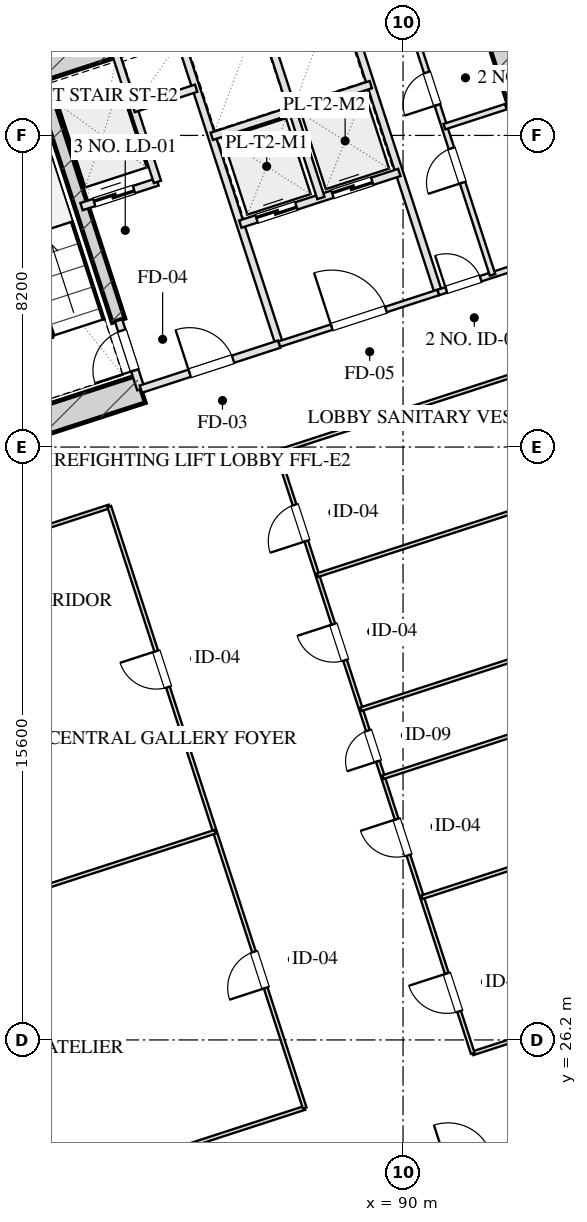
"""IFC4 building model, lengths in metres.
Left out: names, types, materials, properties, quantities, classifications, styles, units other than length and angle.
Written with IfcOpenShell. Run it as: python <this file> out.ifc"""

import sys

from ifc_helpers import new_model, si_unit, direction, frame, frame_2d, origin, place, context, subcontext, project, spatial, rectangle, extrude, element, fill, save


model = new_model("IFC4")
c1 = context("Model", 3, precision=1e-05, world=origin(), true_north=direction((0.0, 1.0)))
c2 = subcontext(c1, "Body", "Model", "MODEL_VIEW")
j1 = project(units=[si_unit("LENGTHUNIT", "METRE"), si_unit("PLANEANGLEUNIT", "RADIAN")], contexts=[c1])
p1 = place(None, origin())
s1 = spatial("IfcSite", under=j1, at=p1, CompositionType="ELEMENT")
p2 = place(p1, origin())
s2 = spatial("IfcBuilding", under=s1, at=p2, CompositionType="ELEMENT")
p3 = place(p2, frame((0.0, 0.0, 74.75)))
s3 = spatial("IfcBuildingStorey", under=s2, at=p3, CompositionType="ELEMENT", Elevation=74.75)
p4 = place(p3, frame((76.272, 50.443, 0.0), z_axis=(0.0, 0.0, 1.0), x_axis=(0.951056072937, 0.309018358888, 0.0)))
e1 = element("IfcWall", 1, at=p4, inside=s3, PredefinedType="SHEAR", context=c2, shape_type="SweptSolid", body=[
    extrude(rectangle(XDim=16.55, YDim=0.75, at=frame_2d((8.275, 0.0))), origin(), (0.0, 0.0, 1.0), 3.45),
])
p5 = place(p3, frame((94.515, 46.639, 0.0), z_axis=(0.0, 0.0, 1.0), x_axis=(-0.309016134813, 0.951056795583, 0.0)))
e2 = element("IfcWall", 2, at=p5, inside=s3, PredefinedType="SHEAR", context=c2, shape_type="SweptSolid", body=[
    extrude(rectangle(XDim=9.63, YDim=0.75, at=frame_2d((4.815, 0.0))), origin(), (0.0, 0.0, 1.0), 3.45),
])
p6 = place(p3, frame((82.514, 45.131, 0.0), z_axis=(0.0, 0.0, 1.0), x_axis=(-0.308988790936, 0.951065679686, 0.0)))
e3 = element("IfcWall", 3, at=p6, inside=s3, PredefinedType="SHEAR", context=c2, shape_type="SweptSolid", body=[
    extrude(rectangle(XDim=6.98, YDim=0.35, at=frame_2d((3.49, 0.0))), origin(), (0.0, 0.0, 1.0), 3.45),
])
p7 = place(p3, frame((79.016, 41.997, 0.0), z_axis=(0.0, 0.0, 1.0), x_axis=(0.95106038264, 0.309005094736, 0.0)))
e4 = element("IfcWall", 4, at=p7, inside=s3, PredefinedType="SHEAR", context=c2, shape_type="SweptSolid", body=[
    extrude(rectangle(XDim=4.295, YDim=0.75, at=frame_2d((2.147, 0.0))), origin(), (0.0, 0.0, 1.0), 3.45),
])
p8 = place(p3, frame((89.899, 22.401, 0.0), z_axis=(0.0, 0.0, 1.0), x_axis=(0.951046716504, 0.309047153403, 0.0)))
e5 = element("IfcWall", 5, at=p8, inside=s3, PredefinedType="PARTITIONING", context=c2, shape_type="SweptSolid", body=[
    extrude(rectangle(XDim=3.83, YDim=0.2, at=frame_2d((1.915, 0.0))), origin(), (0.0, 0.0, 1.0), 3.175),
])
p9 = place(p8, frame((1.35, 0.0, 0.0)))
e6 = element("IfcOpeningElement", 6, at=p9, cuts=e5, PredefinedType="OPENING", context=c2, shape_type="SweptSolid", body=[
    extrude(rectangle(XDim=1.2, YDim=2.05, at=frame_2d((0.6, 1.025))), frame((0.0, 0.11, 0.0), z_axis=(0.0, -1.0, 0.0), x_axis=(1.0, 0.0, 0.0)), (0.0, 0.0, 1.0), 0.22),
])
p10 = place(p3, frame((83.101, 43.324, 0.0), z_axis=(0.0, 0.0, 1.0), x_axis=(-0.309048298632, 0.951046344356, 0.0)))
e7 = element("IfcWall", 7, at=p10, inside=s3, PredefinedType="PARTITIONING", context=c2, shape_type="SweptSolid", body=[
    extrude(rectangle(XDim=1.9, YDim=0.2, at=frame_2d((0.95, 0.0))), origin(), (0.0, 0.0, 1.0), 3.175),
])
p11 = place(p10, frame((0.52, 0.0, 0.0)))
e8 = element("IfcOpeningElement", 8, at=p11, cuts=e7, PredefinedType="OPENING", context=c2, shape_type="SweptSolid", body=[
    extrude(rectangle(XDim=1.1, YDim=2.05, at=frame_2d((0.55, 1.025))), frame((0.0, 0.11, 0.0), z_axis=(0.0, -1.0, 0.0), x_axis=(1.0, 0.0, 0.0)), (0.0, 0.0, 1.0), 0.22),
])
p12 = place(p3, frame((86.743, 44.508, 0.0), z_axis=(0.0, 0.0, 1.0), x_axis=(-0.309016001439, 0.951056838919, 0.0)))
e9 = element("IfcWall", 9, at=p12, inside=s3, PredefinedType="PARTITIONING", context=c2, shape_type="SweptSolid", body=[
    extrude(rectangle(XDim=8.43, YDim=0.2, at=frame_2d((4.215, 0.0))), origin(), (0.0, 0.0, 1.0), 3.175),
])
p13 = place(p3, frame((83.101, 43.324, 0.0), z_axis=(0.0, 0.0, 1.0), x_axis=(0.951052804469, 0.309028417967, 0.0)))
e10 = element("IfcWall", 10, at=p13, inside=s3, PredefinedType="PARTITIONING", context=c2, shape_type="SweptSolid", body=[
    extrude(rectangle(XDim=3.83, YDim=0.2, at=frame_2d((1.915, 0.0))), origin(), (0.0, 0.0, 1.0), 3.175),
])
p14 = place(p13, frame((1.35, 0.0, 0.0)))
e11 = element("IfcOpeningElement", 11, at=p14, cuts=e10, PredefinedType="OPENING", context=c2, shape_type="SweptSolid", body=[
    extrude(rectangle(XDim=1.2, YDim=2.05, at=frame_2d((0.6, 1.025))), frame((0.0, 0.11, 0.0), z_axis=(0.0, -1.0, 0.0), x_axis=(1.0, 0.0, 0.0)), (0.0, 0.0, 1.0), 0.22),
])
p15 = place(p3, frame((81.54, 48.127, 0.0), z_axis=(0.0, 0.0, 1.0), x_axis=(0.951062257173, 0.308999325213, 0.0)))
e12 = element("IfcWall", 12, at=p15, inside=s3, PredefinedType="PARTITIONING", context=c2, shape_type="SweptSolid", body=[
    extrude(rectangle(XDim=2.1, YDim=0.2, at=frame_2d((1.05, 0.0))), origin(), (0.0, 0.0, 1.0), 3.175),
])
p16 = place(p15, frame((0.35, 0.0, 0.0)))
e13 = element("IfcOpeningElement", 13, at=p16, cuts=e12, PredefinedType="OPENING", context=c2, shape_type="SweptSolid", body=[
    extrude(rectangle(XDim=1.1, YDim=2.05, at=frame_2d((0.55, 1.025))), frame((0.0, 0.11, 0.0), z_axis=(0.0, -1.0, 0.0), x_axis=(1.0, 0.0, 0.0)), (0.0, 0.0, 1.0), 0.22),
])
p17 = place(p3, frame((83.538, 48.776, 0.0), z_axis=(0.0, 0.0, 1.0), x_axis=(-0.3089935693, 0.951064127245, 0.0)))
e14 = element("IfcWall", 14, at=p17, inside=s3, PredefinedType="PARTITIONING", context=c2, shape_type="SweptSolid", body=[
    extrude(rectangle(XDim=3.7, YDim=0.2, at=frame_2d((1.85, 0.0))), origin(), (0.0, 0.0, 1.0), 3.175),
])
p18 = place(p3, frame((82.91, 50.707, 0.0), z_axis=(0.0, 0.0, 1.0), x_axis=(0.951041328149, 0.309063734775, 0.0)))
e15 = element("IfcWall", 15, at=p18, inside=s3, PredefinedType="PARTITIONING", context=c2, shape_type="SweptSolid", body=[
    extrude(rectangle(XDim=1.73, YDim=0.2, at=frame_2d((0.865, 0.0))), origin(), (0.0, 0.0, 1.0), 3.175),
])
p19 = place(p3, frame((90.928, 45.868, 0.0), z_axis=(0.0, 0.0, 1.0), x_axis=(-0.309042196757, 0.951048327176, 0.0)))
e16 = element("IfcWall", 16, at=p19, inside=s3, PredefinedType="PARTITIONING", context=c2, shape_type="SweptSolid", body=[
    extrude(rectangle(XDim=8.43, YDim=0.2, at=frame_2d((4.215, 0.0))), origin(), (0.0, 0.0, 1.0), 3.175),
])
p20 = place(p3, frame((86.743, 44.508, 0.0), z_axis=(0.0, 0.0, 1.0), x_axis=(0.951063829732, 0.308994485023, 0.0)))
e17 = element("IfcWall", 17, at=p20, inside=s3, PredefinedType="PARTITIONING", context=c2, shape_type="SweptSolid", body=[
    extrude(rectangle(XDim=4.4, YDim=0.15, at=frame_2d((2.2, 0.0))), origin(), (0.0, 0.0, 1.0), 3.175),
])
p21 = place(p20, frame((1.45, 0.0, 0.0)))
e18 = element("IfcOpeningElement", 18, at=p21, cuts=e17, PredefinedType="OPENING", context=c2, shape_type="SweptSolid", body=[
    extrude(rectangle(XDim=1.5, YDim=2.05, at=frame_2d((0.75, 1.025))), frame((0.0, 0.085, 0.0), z_axis=(0.0, -1.0, 0.0), x_axis=(1.0, 0.0, 0.0)), (0.0, 0.0, 1.0), 0.17),
])
p22 = place(p3, frame((85.718, 47.666, 0.0), z_axis=(0.0, 0.0, 1.0), x_axis=(0.951058531764, 0.30901079133, 0.0)))
e19 = element("IfcWall", 19, at=p22, inside=s3, PredefinedType="PARTITIONING", context=c2, shape_type="SweptSolid", body=[
    extrude(rectangle(XDim=4.4, YDim=0.2, at=frame_2d((2.2, 0.0))), origin(), (0.0, 0.0, 1.0), 3.175),
])
p23 = place(p22, frame((0.45, 0.0, 0.0)))
e20 = element("IfcOpeningElement", 20, at=p23, cuts=e19, PredefinedType="OPENING", context=c2, shape_type="SweptSolid", body=[
    extrude(rectangle(XDim=1.1, YDim=2.05, at=frame_2d((0.55, 1.025))), frame((0.0, 0.11, 0.0), z_axis=(0.0, -1.0, 0.0), x_axis=(1.0, 0.0, 0.0)), (0.0, 0.0, 1.0), 0.22),
])
p24 = place(p22, frame((2.55, 0.0, 0.0)))
e21 = element("IfcOpeningElement", 21, at=p24, cuts=e19, PredefinedType="OPENING", context=c2, shape_type="SweptSolid", body=[
    extrude(rectangle(XDim=1.1, YDim=2.05, at=frame_2d((0.55, 1.025))), frame((0.0, 0.11, 0.0), z_axis=(0.0, -1.0, 0.0), x_axis=(1.0, 0.0, 0.0)), (0.0, 0.0, 1.0), 0.22),
])
p25 = place(p3, frame((87.838, 48.354, 0.0), z_axis=(0.0, 0.0, 1.0), x_axis=(-0.3090093719, 0.951058992953, 0.0)))
e22 = element("IfcWall", 22, at=p25, inside=s3, PredefinedType="PARTITIONING", context=c2, shape_type="SweptSolid", body=[
    extrude(rectangle(XDim=5.11, YDim=0.2, at=frame_2d((2.555, 0.0))), origin(), (0.0, 0.0, 1.0), 3.175),
])
p26 = place(p3, frame((84.967, 49.977, 0.0), z_axis=(0.0, 0.0, 1.0), x_axis=(0.951063829732, 0.308994485023, 0.0)))
e23 = element("IfcWall", 23, at=p26, inside=s3, PredefinedType="PARTITIONING", context=c2, shape_type="SweptSolid", body=[
    extrude(rectangle(XDim=4.4, YDim=0.2, at=frame_2d((2.2, 0.0))), origin(), (0.0, 0.0, 1.0), 3.175),
])
p27 = place(p3, frame((90.928, 45.868, 0.0), z_axis=(0.0, 0.0, 1.0), x_axis=(0.951059297078, 0.309008435874, 0.0)))
e24 = element("IfcWall", 24, at=p27, inside=s3, PredefinedType="PARTITIONING", context=c2, shape_type="SweptSolid", body=[
    extrude(rectangle(XDim=3.2, YDim=0.15, at=frame_2d((1.6, 0.0))), origin(), (0.0, 0.0, 1.0), 3.175),
])
p28 = place(p27, frame((0.22, 0.0, 0.0)))
e25 = element("IfcOpeningElement", 25, at=p28, cuts=e24, PredefinedType="OPENING", context=c2, shape_type="SweptSolid", body=[
    extrude(rectangle(XDim=0.95, YDim=2.05, at=frame_2d((0.475, 1.025))), frame((0.0, 0.085, 0.0), z_axis=(0.0, -1.0, 0.0), x_axis=(1.0, 0.0, 0.0)), (0.0, 0.0, 1.0), 0.17),
])
p29 = place(p3, frame((92.355, 46.331, 0.0), z_axis=(0.0, 0.0, 1.0), x_axis=(-0.309007490203, 0.951059604335, 0.0)))
e26 = element("IfcWall", 26, at=p29, inside=s3, PredefinedType="PARTITIONING", context=c2, shape_type="SweptSolid", body=[
    extrude(rectangle(XDim=8.43, YDim=0.15, at=frame_2d((4.215, 0.0))), origin(), (0.0, 0.0, 1.0), 3.175),
])
p30 = place(p29, frame((2.55, 0.0, 0.0)))
e27 = element("IfcOpeningElement", 27, at=p30, cuts=e26, PredefinedType="OPENING", context=c2, shape_type="SweptSolid", body=[
    extrude(rectangle(XDim=0.95, YDim=2.05, at=frame_2d((0.475, 1.025))), frame((0.0, 0.085, 0.0), z_axis=(0.0, -1.0, 0.0), x_axis=(1.0, 0.0, 0.0)), (0.0, 0.0, 1.0), 0.17),
])
p31 = place(p29, frame((4.7, 0.0, 0.0)))
e28 = element("IfcOpeningElement", 28, at=p31, cuts=e26, PredefinedType="OPENING", context=c2, shape_type="SweptSolid", body=[
    extrude(rectangle(XDim=0.9, YDim=2.05, at=frame_2d((0.45, 1.025))), frame((0.0, 0.085, 0.0), z_axis=(0.0, -1.0, 0.0), x_axis=(1.0, 0.0, 0.0)), (0.0, 0.0, 1.0), 0.17),
])
p32 = place(p29, frame((6.8, 0.0, 0.0)))
e29 = element("IfcOpeningElement", 29, at=p32, cuts=e26, PredefinedType="OPENING", context=c2, shape_type="SweptSolid", body=[
    extrude(rectangle(XDim=0.9, YDim=2.05, at=frame_2d((0.45, 1.025))), frame((0.0, 0.085, 0.0), z_axis=(0.0, -1.0, 0.0), x_axis=(1.0, 0.0, 0.0)), (0.0, 0.0, 1.0), 0.17),
])
p33 = place(p3, frame((91.088, 50.23, 0.0), z_axis=(0.0, 0.0, 1.0), x_axis=(0.951054116971, 0.309024378638, 0.0)))
e30 = element("IfcWall", 30, at=p33, inside=s3, PredefinedType="PARTITIONING", context=c2, shape_type="SweptSolid", body=[
    extrude(rectangle(XDim=1.7, YDim=0.15, at=frame_2d((0.85, 0.0))), origin(), (0.0, 0.0, 1.0), 3.175),
])
p34 = place(p3, frame((74.691, 20.278, 0.0), z_axis=(0.0, 0.0, 1.0), x_axis=(0.951052712421, 0.309028701251, 0.0)))
e31 = element("IfcWall", 31, at=p34, inside=s3, PredefinedType="MOVABLE", context=c2, shape_type="SweptSolid", body=[
    extrude(rectangle(XDim=13.375, YDim=0.1, at=frame_2d((6.688, 0.0))), origin(), (0.0, 0.0, 1.0), 3.175),
])
p35 = place(p3, frame((91.834, 25.848, 0.0), z_axis=(0.0, 0.0, 1.0), x_axis=(0.951055605195, 0.309019798438, 0.0)))
e32 = element("IfcWall", 32, at=p35, inside=s3, PredefinedType="MOVABLE", context=c2, shape_type="SweptSolid", body=[
    extrude(rectangle(XDim=19.575, YDim=0.1, at=frame_2d((9.788, 0.0))), origin(), (0.0, 0.0, 1.0), 3.175),
])
p36 = place(p3, frame((69.549, 36.103, 0.0), z_axis=(0.0, 0.0, 1.0), x_axis=(0.951058077006, 0.309012190961, 0.0)))
e33 = element("IfcWall", 33, at=p36, inside=s3, PredefinedType="MOVABLE", context=c2, shape_type="SweptSolid", body=[
    extrude(rectangle(XDim=13.375, YDim=0.1, at=frame_2d((6.688, 0.0))), origin(), (0.0, 0.0, 1.0), 3.175),
])
p37 = place(p3, frame((86.692, 41.673, 0.0), z_axis=(0.0, 0.0, 1.0), x_axis=(0.951055605195, 0.309019798438, 0.0)))
e34 = element("IfcWall", 34, at=p37, inside=s3, PredefinedType="MOVABLE", context=c2, shape_type="SweptSolid", body=[
    extrude(rectangle(XDim=19.575, YDim=0.1, at=frame_2d((9.788, 0.0))), origin(), (0.0, 0.0, 1.0), 3.175),
])
p38 = place(p3, frame((87.412, 24.411, 0.0), z_axis=(0.0, 0.0, 1.0), x_axis=(-0.309022042254, 0.951054876125, 0.0)))
e35 = element("IfcWall", 35, at=p38, inside=s3, PredefinedType="MOVABLE", context=c2, shape_type="SweptSolid", body=[
    extrude(rectangle(XDim=16.64, YDim=0.1, at=frame_2d((8.32, 0.0))), origin(), (0.0, 0.0, 1.0), 3.175),
])
p39 = place(p38, frame((3.32, 0.0, 0.0)))
e36 = element("IfcOpeningElement", 36, at=p39, cuts=e35, PredefinedType="OPENING", context=c2, shape_type="SweptSolid", body=[
    extrude(rectangle(XDim=1.0, YDim=2.05, at=frame_2d((0.5, 1.025))), frame((0.0, 0.06, 0.0), z_axis=(0.0, -1.0, 0.0), x_axis=(1.0, 0.0, 0.0)), (0.0, 0.0, 1.0), 0.12),
])
p40 = place(p38, frame((11.64, 0.0, 0.0)))
e37 = element("IfcOpeningElement", 37, at=p40, cuts=e35, PredefinedType="OPENING", context=c2, shape_type="SweptSolid", body=[
    extrude(rectangle(XDim=1.0, YDim=2.05, at=frame_2d((0.5, 1.025))), frame((0.0, 0.06, 0.0), z_axis=(0.0, -1.0, 0.0), x_axis=(1.0, 0.0, 0.0)), (0.0, 0.0, 1.0), 0.12),
])
p41 = place(p3, frame((91.834, 25.848, 0.0), z_axis=(0.0, 0.0, 1.0), x_axis=(-0.30901773025, 0.951056277195, 0.0)))
e38 = element("IfcWall", 38, at=p41, inside=s3, PredefinedType="MOVABLE", context=c2, shape_type="SweptSolid", body=[
    extrude(rectangle(XDim=16.64, YDim=0.1, at=frame_2d((8.32, 0.0))), origin(), (0.0, 0.0, 1.0), 3.175),
])
p42 = place(p41, frame((1.16, 0.0, 0.0)))
e39 = element("IfcOpeningElement", 39, at=p42, cuts=e38, PredefinedType="OPENING", context=c2, shape_type="SweptSolid", body=[
    extrude(rectangle(XDim=1.05, YDim=2.05, at=frame_2d((0.525, 1.025))), frame((0.0, 0.06, 0.0), z_axis=(0.0, -1.0, 0.0), x_axis=(1.0, 0.0, 0.0)), (0.0, 0.0, 1.0), 0.12),
])
p43 = place(p41, frame((5.48, 0.0, 0.0)))
e40 = element("IfcOpeningElement", 40, at=p43, cuts=e38, PredefinedType="OPENING", context=c2, shape_type="SweptSolid", body=[
    extrude(rectangle(XDim=1.0, YDim=2.05, at=frame_2d((0.5, 1.025))), frame((0.0, 0.06, 0.0), z_axis=(0.0, -1.0, 0.0), x_axis=(1.0, 0.0, 0.0)), (0.0, 0.0, 1.0), 0.12),
])
p44 = place(p41, frame((8.08, 0.0, 0.0)))
e41 = element("IfcOpeningElement", 41, at=p44, cuts=e38, PredefinedType="OPENING", context=c2, shape_type="SweptSolid", body=[
    extrude(rectangle(XDim=0.85, YDim=2.05, at=frame_2d((0.425, 1.025))), frame((0.0, 0.06, 0.0), z_axis=(0.0, -1.0, 0.0), x_axis=(1.0, 0.0, 0.0)), (0.0, 0.0, 1.0), 0.12),
])
p45 = place(p41, frame((10.874, 0.0, 0.0)))
e42 = element("IfcOpeningElement", 42, at=p45, cuts=e38, PredefinedType="OPENING", context=c2, shape_type="SweptSolid", body=[
    extrude(rectangle(XDim=1.0, YDim=2.05, at=frame_2d((0.5, 1.025))), frame((0.0, 0.06, 0.0), z_axis=(0.0, -1.0, 0.0), x_axis=(1.0, 0.0, 0.0)), (0.0, 0.0, 1.0), 0.12),
])
p46 = place(p41, frame((14.174, 0.0, 0.0)))
e43 = element("IfcOpeningElement", 43, at=p46, cuts=e38, PredefinedType="OPENING", context=c2, shape_type="SweptSolid", body=[
    extrude(rectangle(XDim=1.0, YDim=2.05, at=frame_2d((0.5, 1.025))), frame((0.0, 0.06, 0.0), z_axis=(0.0, -1.0, 0.0), x_axis=(1.0, 0.0, 0.0)), (0.0, 0.0, 1.0), 0.12),
])
p47 = place(p3, frame((72.33, 27.544, 0.0), z_axis=(0.0, 0.0, 1.0), x_axis=(0.951056333968, 0.309017555521, 0.0)))
e44 = element("IfcWall", 44, at=p47, inside=s3, PredefinedType="MOVABLE", context=c2, shape_type="SweptSolid", body=[
    extrude(rectangle(XDim=13.375, YDim=0.1, at=frame_2d((6.688, 0.0))), origin(), (0.0, 0.0, 1.0), 3.175),
])
for number, where, z_axis, x_axis in (
    (45, (90.499, 29.956, 0.0), (0.0, 0.0, 1.0), (0.951, 0.309, 0.0)),
    (46, (89.473, 33.114, 0.0), (0.0, 0.0, 1.0), (0.951, 0.309, 0.0)),
    (47, (88.892, 34.902, 0.0), (0.0, 0.0, 1.0), (0.951, 0.309, 0.0)),
    (48, (87.746, 38.429, 0.0), (0.0, 0.0, 1.0), (0.951, 0.309, 0.0)),
):
    element("IfcWall", number, at=place(p3, frame(where, z_axis=z_axis, x_axis=x_axis)), inside=s3, PredefinedType="MOVABLE", context=c2, shape_type="SweptSolid", body=[
        extrude(rectangle(XDim=19.575, YDim=0.1, at=frame_2d((9.788, 0.0))), origin(), (0.0, 0.0, 1.0), 3.175),
    ])
p48 = place(p11, origin())
e49 = element("IfcDoor", 49, at=p48, inside=s3, OperationType="SINGLE_SWING_LEFT", PredefinedType="DOOR", context=c2, shape_type="SweptSolid", body=[
    extrude(rectangle(XDim=1.1, YDim=2.05, at=frame_2d((0.55, 1.025))), frame((0.0, 0.025, 0.0), z_axis=(0.0, -1.0, 0.0), x_axis=(1.0, 0.0, 0.0)), (0.0, 0.0, 1.0), 0.05),
])
fill(e8, e49)
p49 = place(p14, origin())
e50 = element("IfcDoor", 50, at=p49, inside=s3, OperationType="SINGLE_SWING_LEFT", PredefinedType="DOOR", context=c2, shape_type="SweptSolid", body=[
    extrude(rectangle(XDim=1.2, YDim=2.05, at=frame_2d((0.6, 1.025))), frame((0.0, 0.025, 0.0), z_axis=(0.0, -1.0, 0.0), x_axis=(1.0, 0.0, 0.0)), (0.0, 0.0, 1.0), 0.05),
])
fill(e11, e50)
p50 = place(p16, origin())
e51 = element("IfcDoor", 51, at=p50, inside=s3, OperationType="DOUBLE_DOOR_SLIDING", PredefinedType="DOOR", context=c2, shape_type="SweptSolid", body=[
    extrude(rectangle(XDim=1.1, YDim=2.05, at=frame_2d((0.55, 1.025))), frame((0.0, 0.025, 0.0), z_axis=(0.0, -1.0, 0.0), x_axis=(1.0, 0.0, 0.0)), (0.0, 0.0, 1.0), 0.05),
])
fill(e13, e51)
p51 = place(p21, origin())
e52 = element("IfcDoor", 52, at=p51, inside=s3, OperationType="SINGLE_SWING_LEFT", PredefinedType="DOOR", context=c2, shape_type="SweptSolid", body=[
    extrude(rectangle(XDim=1.5, YDim=2.05, at=frame_2d((0.75, 1.025))), frame((0.0, 0.025, 0.0), z_axis=(0.0, -1.0, 0.0), x_axis=(1.0, 0.0, 0.0)), (0.0, 0.0, 1.0), 0.05),
])
fill(e18, e52)
p52 = place(p23, origin())
e53 = element("IfcDoor", 53, at=p52, inside=s3, OperationType="DOUBLE_DOOR_SLIDING", PredefinedType="DOOR", context=c2, shape_type="SweptSolid", body=[
    extrude(rectangle(XDim=1.1, YDim=2.05, at=frame_2d((0.55, 1.025))), frame((0.0, 0.025, 0.0), z_axis=(0.0, -1.0, 0.0), x_axis=(1.0, 0.0, 0.0)), (0.0, 0.0, 1.0), 0.05),
])
fill(e20, e53)
p53 = place(p24, origin())
e54 = element("IfcDoor", 54, at=p53, inside=s3, OperationType="DOUBLE_DOOR_SLIDING", PredefinedType="DOOR", context=c2, shape_type="SweptSolid", body=[
    extrude(rectangle(XDim=1.1, YDim=2.05, at=frame_2d((0.55, 1.025))), frame((0.0, 0.025, 0.0), z_axis=(0.0, -1.0, 0.0), x_axis=(1.0, 0.0, 0.0)), (0.0, 0.0, 1.0), 0.05),
])
fill(e21, e54)
p54 = place(p28, origin())
e55 = element("IfcDoor", 55, at=p54, inside=s3, OperationType="SINGLE_SWING_LEFT", PredefinedType="DOOR", context=c2, shape_type="SweptSolid", body=[
    extrude(rectangle(XDim=0.95, YDim=2.05, at=frame_2d((0.475, 1.025))), frame((0.0, 0.025, 0.0), z_axis=(0.0, -1.0, 0.0), x_axis=(1.0, 0.0, 0.0)), (0.0, 0.0, 1.0), 0.05),
])
fill(e25, e55)
p55 = place(p30, origin())
e56 = element("IfcDoor", 56, at=p55, inside=s3, OperationType="SINGLE_SWING_LEFT", PredefinedType="DOOR", context=c2, shape_type="SweptSolid", body=[
    extrude(rectangle(XDim=0.95, YDim=2.05, at=frame_2d((0.475, 1.025))), frame((0.0, 0.025, 0.0), z_axis=(0.0, -1.0, 0.0), x_axis=(1.0, 0.0, 0.0)), (0.0, 0.0, 1.0), 0.05),
])
fill(e27, e56)
p56 = place(p31, origin())
e57 = element("IfcDoor", 57, at=p56, inside=s3, OperationType="SINGLE_SWING_LEFT", PredefinedType="DOOR", context=c2, shape_type="SweptSolid", body=[
    extrude(rectangle(XDim=0.9, YDim=2.05, at=frame_2d((0.45, 1.025))), frame((0.0, 0.025, 0.0), z_axis=(0.0, -1.0, 0.0), x_axis=(1.0, 0.0, 0.0)), (0.0, 0.0, 1.0), 0.05),
])
fill(e28, e57)
p57 = place(p39, origin())
e58 = element("IfcDoor", 58, at=p57, inside=s3, OperationType="SINGLE_SWING_LEFT", PredefinedType="DOOR", context=c2, shape_type="SweptSolid", body=[
    extrude(rectangle(XDim=1.0, YDim=2.05, at=frame_2d((0.5, 1.025))), frame((0.0, 0.025, 0.0), z_axis=(0.0, -1.0, 0.0), x_axis=(1.0, 0.0, 0.0)), (0.0, 0.0, 1.0), 0.05),
])
fill(e36, e58)
p58 = place(p40, origin())
e59 = element("IfcDoor", 59, at=p58, inside=s3, OperationType="SINGLE_SWING_RIGHT", PredefinedType="DOOR", context=c2, shape_type="SweptSolid", body=[
    extrude(rectangle(XDim=1.0, YDim=2.05, at=frame_2d((0.5, 1.025))), frame((0.0, 0.025, 0.0), z_axis=(0.0, -1.0, 0.0), x_axis=(1.0, 0.0, 0.0)), (0.0, 0.0, 1.0), 0.05),
])
fill(e37, e59)
p59 = place(p42, origin())
e60 = element("IfcDoor", 60, at=p59, inside=s3, OperationType="SINGLE_SWING_RIGHT", PredefinedType="DOOR", context=c2, shape_type="SweptSolid", body=[
    extrude(rectangle(XDim=1.05, YDim=2.05, at=frame_2d((0.525, 1.025))), frame((0.0, 0.025, 0.0), z_axis=(0.0, -1.0, 0.0), x_axis=(1.0, 0.0, 0.0)), (0.0, 0.0, 1.0), 0.05),
])
fill(e39, e60)
p60 = place(p43, origin())
e61 = element("IfcDoor", 61, at=p60, inside=s3, OperationType="SINGLE_SWING_RIGHT", PredefinedType="DOOR", context=c2, shape_type="SweptSolid", body=[
    extrude(rectangle(XDim=1.0, YDim=2.05, at=frame_2d((0.5, 1.025))), frame((0.0, 0.025, 0.0), z_axis=(0.0, -1.0, 0.0), x_axis=(1.0, 0.0, 0.0)), (0.0, 0.0, 1.0), 0.05),
])
fill(e40, e61)
p61 = place(p44, origin())
e62 = element("IfcDoor", 62, at=p61, inside=s3, OperationType="SINGLE_SWING_LEFT", PredefinedType="DOOR", context=c2, shape_type="SweptSolid", body=[
    extrude(rectangle(XDim=0.85, YDim=2.05, at=frame_2d((0.425, 1.025))), frame((0.0, 0.025, 0.0), z_axis=(0.0, -1.0, 0.0), x_axis=(1.0, 0.0, 0.0)), (0.0, 0.0, 1.0), 0.05),
])
fill(e41, e62)
p62 = place(p45, origin())
e63 = element("IfcDoor", 63, at=p62, inside=s3, OperationType="SINGLE_SWING_RIGHT", PredefinedType="DOOR", context=c2, shape_type="SweptSolid", body=[
    extrude(rectangle(XDim=1.0, YDim=2.05, at=frame_2d((0.5, 1.025))), frame((0.0, 0.025, 0.0), z_axis=(0.0, -1.0, 0.0), x_axis=(1.0, 0.0, 0.0)), (0.0, 0.0, 1.0), 0.05),
])
fill(e42, e63)
p63 = place(p46, origin())
e64 = element("IfcDoor", 64, at=p63, inside=s3, OperationType="SINGLE_SWING_LEFT", PredefinedType="DOOR", context=c2, shape_type="SweptSolid", body=[
    extrude(rectangle(XDim=1.0, YDim=2.05, at=frame_2d((0.5, 1.025))), frame((0.0, 0.025, 0.0), z_axis=(0.0, -1.0, 0.0), x_axis=(1.0, 0.0, 0.0)), (0.0, 0.0, 1.0), 0.05),
])
fill(e43, e64)
save(model, sys.argv[1])
